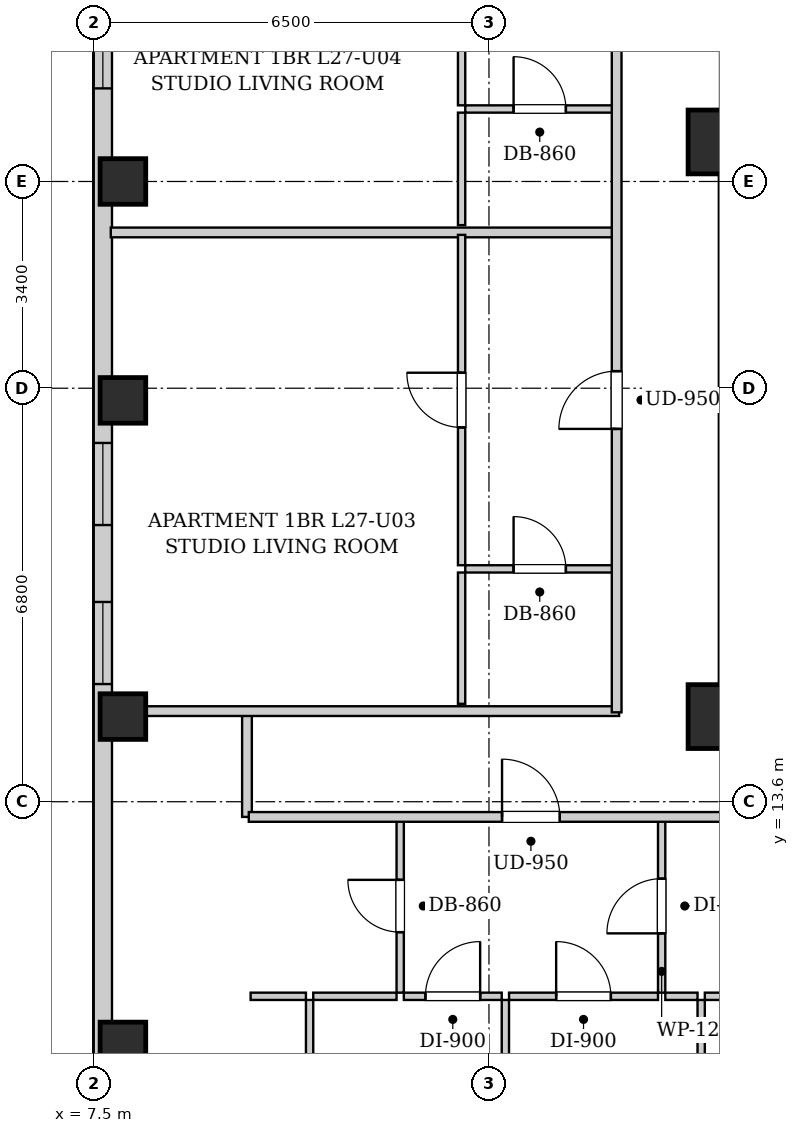
"""IFC4 building model, lengths in metres.
Left out: names, types, materials, properties, quantities, classifications, styles, units other than length and angle.
Written with IfcOpenShell. Run it as: python <this file> out.ifc"""

import sys

from ifc_helpers import new_model, si_unit, direction, frame, frame_2d, origin, origin_2d, place, context, subcontext, project, spatial, rectangle, extrude, element, fill, save


model = new_model("IFC4")
c1 = context("Model", 3, precision=1e-05, world=origin(), true_north=direction((0.0, 1.0)))
c2 = subcontext(c1, "Body", "Model", "MODEL_VIEW")
j1 = project(units=[si_unit("LENGTHUNIT", "METRE"), si_unit("PLANEANGLEUNIT", "RADIAN")], contexts=[c1])
p1 = place(None, origin())
s1 = spatial("IfcSite", under=j1, at=p1, CompositionType="ELEMENT")
p2 = place(p1, origin())
s2 = spatial("IfcBuilding", under=s1, at=p2, CompositionType="ELEMENT")
p3 = place(p2, frame((0.0, 0.0, 97.5)))
s3 = spatial("IfcBuildingStorey", under=s2, at=p3, CompositionType="ELEMENT", Elevation=97.5)
for number, where, z_axis, x_axis in (
    (1, (7.98, 9.6, 0.0), (0.0, 0.0, 1.0), (1.0, 0.0, 0.0)),
    (2, (7.98, 15.0, 0.0), (0.0, 0.0, 1.0), (1.0, 0.0, 0.0)),
    (3, (7.98, 20.2, 0.0), (0.0, 0.0, 1.0), (1.0, 0.0, 0.0)),
    (4, (7.98, 23.8, 0.0), (0.0, 0.0, 1.0), (1.0, 0.0, 0.0)),
):
    element("IfcColumn", number, at=place(p3, frame(where, z_axis=z_axis, x_axis=x_axis)), inside=s3, PredefinedType="COLUMN", context=c2, shape_type="SweptSolid", body=[
        extrude(rectangle(XDim=0.75, YDim=0.75, at=origin_2d()), origin(), (0.0, 0.0, 1.0), 3.2),
    ])
for number, where, z_axis, x_axis in (
    (5, (17.8, 15.0, 0.0), (0.0, 0.0, 1.0), (1.0, 0.0, 0.0)),
    (6, (17.8, 24.45, 0.0), (0.0, 0.0, 1.0), (1.0, 0.0, 0.0)),
):
    element("IfcColumn", number, at=place(p3, frame(where, z_axis=z_axis, x_axis=x_axis)), inside=s3, PredefinedType="COLUMN", context=c2, shape_type="SweptSolid", body=[
        extrude(rectangle(XDim=1.05, YDim=1.05, at=origin_2d()), origin(), (0.0, 0.0, 1.0), 3.2),
    ])
p4 = place(p3, frame((7.65, 2.5, 0.0), z_axis=(0.0, 0.0, 1.0), x_axis=(0.0, 1.0, 0.0)))
e7 = element("IfcWall", 7, at=p4, inside=s3, PredefinedType="SOLIDWALL", context=c2, shape_type="SweptSolid", body=[
    extrude(rectangle(XDim=38.3, YDim=0.3, at=frame_2d((19.15, 0.0))), origin(), (0.0, 0.0, 1.0), 2.94),
])
p5 = place(p4, frame((3.38, 0.0, 0.55)))
e8 = element("IfcOpeningElement", 8, at=p5, cuts=e7, PredefinedType="OPENING", context=c2, shape_type="SweptSolid", body=[
    extrude(rectangle(XDim=1.35, YDim=1.2, at=frame_2d((0.675, 0.6))), frame((0.0, 0.16, 0.0), z_axis=(0.0, -1.0, 0.0), x_axis=(1.0, 0.0, 0.0)), (0.0, 0.0, 1.0), 0.32),
])
p6 = place(p4, frame((1.135, 0.0, 0.55)))
e9 = element("IfcOpeningElement", 9, at=p6, cuts=e7, PredefinedType="OPENING", context=c2, shape_type="SweptSolid", body=[
    extrude(rectangle(XDim=1.35, YDim=1.2, at=frame_2d((0.675, 0.6))), frame((0.0, 0.16, 0.0), z_axis=(0.0, -1.0, 0.0), x_axis=(1.0, 0.0, 0.0)), (0.0, 0.0, 1.0), 0.32),
])
p7 = place(p4, frame((33.946, 0.0, 0.55)))
e10 = element("IfcOpeningElement", 10, at=p7, cuts=e7, PredefinedType="OPENING", context=c2, shape_type="SweptSolid", body=[
    extrude(rectangle(XDim=1.35, YDim=1.2, at=frame_2d((0.675, 0.6))), frame((0.0, 0.16, 0.0), z_axis=(0.0, -1.0, 0.0), x_axis=(1.0, 0.0, 0.0)), (0.0, 0.0, 1.0), 0.32),
])
p8 = place(p4, frame((32.035, 0.0, 0.55)))
e11 = element("IfcOpeningElement", 11, at=p8, cuts=e7, PredefinedType="OPENING", context=c2, shape_type="SweptSolid", body=[
    extrude(rectangle(XDim=1.35, YDim=1.2, at=frame_2d((0.675, 0.6))), frame((0.0, 0.16, 0.0), z_axis=(0.0, -1.0, 0.0), x_axis=(1.0, 0.0, 0.0)), (0.0, 0.0, 1.0), 0.32),
])
p9 = place(p4, frame((15.65, 0.0, 0.55)))
e12 = element("IfcOpeningElement", 12, at=p9, cuts=e7, PredefinedType="OPENING", context=c2, shape_type="SweptSolid", body=[
    extrude(rectangle(XDim=1.35, YDim=1.2, at=frame_2d((0.675, 0.6))), frame((0.0, 0.16, 0.0), z_axis=(0.0, -1.0, 0.0), x_axis=(1.0, 0.0, 0.0)), (0.0, 0.0, 1.0), 0.32),
])
p10 = place(p4, frame((13.035, 0.0, 0.55)))
e13 = element("IfcOpeningElement", 13, at=p10, cuts=e7, PredefinedType="OPENING", context=c2, shape_type="SweptSolid", body=[
    extrude(rectangle(XDim=1.35, YDim=1.2, at=frame_2d((0.675, 0.6))), frame((0.0, 0.16, 0.0), z_axis=(0.0, -1.0, 0.0), x_axis=(1.0, 0.0, 0.0)), (0.0, 0.0, 1.0), 0.32),
])
p11 = place(p4, frame((22.831, 0.0, 0.55)))
e14 = element("IfcOpeningElement", 14, at=p11, cuts=e7, PredefinedType="OPENING", context=c2, shape_type="SweptSolid", body=[
    extrude(rectangle(XDim=1.35, YDim=1.2, at=frame_2d((0.675, 0.6))), frame((0.0, 0.16, 0.0), z_axis=(0.0, -1.0, 0.0), x_axis=(1.0, 0.0, 0.0)), (0.0, 0.0, 1.0), 0.32),
])
p12 = place(p4, frame((24.441, 0.0, 0.55)))
e15 = element("IfcOpeningElement", 15, at=p12, cuts=e7, PredefinedType="OPENING", context=c2, shape_type="SweptSolid", body=[
    extrude(rectangle(XDim=1.35, YDim=1.2, at=frame_2d((0.675, 0.6))), frame((0.0, 0.16, 0.0), z_axis=(0.0, -1.0, 0.0), x_axis=(1.0, 0.0, 0.0)), (0.0, 0.0, 1.0), 0.32),
])
p13 = place(p3, frame((10.02, 13.35, 0.0), z_axis=(0.0, 0.0, 1.0), x_axis=(0.0, 1.0, 0.0)))
e16 = element("IfcWall", 16, at=p13, inside=s3, PredefinedType="PARTITIONING", context=c2, shape_type="SweptSolid", body=[
    extrude(rectangle(XDim=1.74, YDim=0.16, at=frame_2d((0.87, 0.0))), origin(), (0.0, 0.0, 1.0), 2.94),
])
p14 = place(p3, frame((7.78, 15.09, 0.0), z_axis=(0.0, 0.0, 1.0), x_axis=(1.0, 0.0, 0.0)))
e17 = element("IfcWall", 17, at=p14, inside=s3, PredefinedType="PARTITIONING", context=c2, shape_type="SweptSolid", body=[
    extrude(rectangle(XDim=8.36, YDim=0.16, at=frame_2d((4.18, 0.0))), origin(), (0.0, 0.0, 1.0), 2.313),
])
p15 = place(p3, frame((12.54, 10.46, 0.0), z_axis=(0.0, 0.0, 1.0), x_axis=(0.0, 1.0, 0.0)))
e18 = element("IfcWall", 18, at=p15, inside=s3, PredefinedType="PARTITIONING", context=c2, shape_type="SweptSolid", body=[
    extrude(rectangle(XDim=2.85, YDim=0.12, at=frame_2d((1.425, 0.0))), origin(), (0.0, 0.0, 1.0), 2.94),
])
p16 = place(p15, frame((0.995, 0.0, 0.0)))
e19 = element("IfcOpeningElement", 19, at=p16, cuts=e18, PredefinedType="OPENING", context=c2, shape_type="SweptSolid", body=[
    extrude(rectangle(XDim=0.86, YDim=2.05, at=frame_2d((0.43, 1.025))), frame((0.0, 0.07, 0.0), z_axis=(0.0, -1.0, 0.0), x_axis=(1.0, 0.0, 0.0)), (0.0, 0.0, 1.0), 0.14),
])
p17 = place(p3, frame((10.08, 10.4, 0.0), z_axis=(0.0, 0.0, 1.0), x_axis=(1.0, 0.0, 0.0)))
e20 = element("IfcWall", 20, at=p17, inside=s3, PredefinedType="PARTITIONING", context=c2, shape_type="SweptSolid", body=[
    extrude(rectangle(XDim=0.91, YDim=0.12, at=frame_2d((0.455, 0.0))), origin(), (0.0, 0.0, 1.0), 2.94),
])
p18 = place(p3, frame((11.11, 10.4, 0.0), z_axis=(0.0, 0.0, 1.0), x_axis=(1.0, 0.0, 0.0)))
e21 = element("IfcWall", 21, at=p18, inside=s3, PredefinedType="PARTITIONING", context=c2, shape_type="SweptSolid", body=[
    extrude(rectangle(XDim=1.37, YDim=0.12, at=frame_2d((0.685, 0.0))), origin(), (0.0, 0.0, 1.0), 2.94),
])
p19 = place(p3, frame((16.84, 10.46, 0.0), z_axis=(0.0, 0.0, 1.0), x_axis=(0.0, 1.0, 0.0)))
e22 = element("IfcWall", 22, at=p19, inside=s3, PredefinedType="PARTITIONING", context=c2, shape_type="SweptSolid", body=[
    extrude(rectangle(XDim=2.85, YDim=0.12, at=frame_2d((1.425, 0.0))), origin(), (0.0, 0.0, 1.0), 2.94),
])
p20 = place(p19, frame((0.975, 0.0, 0.0)))
e23 = element("IfcOpeningElement", 23, at=p20, cuts=e22, PredefinedType="OPENING", context=c2, shape_type="SweptSolid", body=[
    extrude(rectangle(XDim=0.9, YDim=2.05, at=frame_2d((0.45, 1.025))), frame((0.0, 0.07, 0.0), z_axis=(0.0, -1.0, 0.0), x_axis=(1.0, 0.0, 0.0)), (0.0, 0.0, 1.0), 0.14),
])
p21 = place(p3, frame((12.6, 10.4, 0.0), z_axis=(0.0, 0.0, 1.0), x_axis=(1.0, 0.0, 0.0)))
e24 = element("IfcWall", 24, at=p21, inside=s3, PredefinedType="PARTITIONING", context=c2, shape_type="SweptSolid", body=[
    extrude(rectangle(XDim=1.61, YDim=0.12, at=frame_2d((0.805, 0.0))), origin(), (0.0, 0.0, 1.0), 2.94),
])
p22 = place(p21, frame((0.355, 0.0, 0.0)))
e25 = element("IfcOpeningElement", 25, at=p22, cuts=e24, PredefinedType="OPENING", context=c2, shape_type="SweptSolid", body=[
    extrude(rectangle(XDim=0.9, YDim=2.05, at=frame_2d((0.45, 1.025))), frame((0.0, 0.07, 0.0), z_axis=(0.0, -1.0, 0.0), x_axis=(1.0, 0.0, 0.0)), (0.0, 0.0, 1.0), 0.14),
])
p23 = place(p3, frame((14.33, 10.4, 0.0), z_axis=(0.0, 0.0, 1.0), x_axis=(1.0, 0.0, 0.0)))
e26 = element("IfcWall", 26, at=p23, inside=s3, PredefinedType="PARTITIONING", context=c2, shape_type="SweptSolid", body=[
    extrude(rectangle(XDim=2.45, YDim=0.12, at=frame_2d((1.225, 0.0))), origin(), (0.0, 0.0, 1.0), 2.94),
])
p24 = place(p23, frame((0.775, 0.0, 0.0)))
e27 = element("IfcOpeningElement", 27, at=p24, cuts=e26, PredefinedType="OPENING", context=c2, shape_type="SweptSolid", body=[
    extrude(rectangle(XDim=0.9, YDim=2.05, at=frame_2d((0.45, 1.025))), frame((0.0, 0.07, 0.0), z_axis=(0.0, -1.0, 0.0), x_axis=(1.0, 0.0, 0.0)), (0.0, 0.0, 1.0), 0.14),
])
p25 = place(p3, frame((16.9, 10.4, 0.0), z_axis=(0.0, 0.0, 1.0), x_axis=(1.0, 0.0, 0.0)))
e28 = element("IfcWall", 28, at=p25, inside=s3, PredefinedType="PARTITIONING", context=c2, shape_type="SweptSolid", body=[
    extrude(rectangle(XDim=0.53, YDim=0.12, at=frame_2d((0.265, 0.0))), origin(), (0.0, 0.0, 1.0), 2.94),
])
p26 = place(p3, frame((17.55, 10.4, 0.0), z_axis=(0.0, 0.0, 1.0), x_axis=(1.0, 0.0, 0.0)))
e29 = element("IfcWall", 29, at=p26, inside=s3, PredefinedType="PARTITIONING", context=c2, shape_type="SweptSolid", body=[
    extrude(rectangle(XDim=2.5, YDim=0.12, at=frame_2d((1.25, 0.0))), origin(), (0.0, 0.0, 1.0), 2.94),
])
p27 = place(p26, frame((0.8, 0.0, 0.0)))
e30 = element("IfcOpeningElement", 30, at=p27, cuts=e29, PredefinedType="OPENING", context=c2, shape_type="SweptSolid", body=[
    extrude(rectangle(XDim=0.9, YDim=2.05, at=frame_2d((0.45, 1.025))), frame((0.0, 0.07, 0.0), z_axis=(0.0, -1.0, 0.0), x_axis=(1.0, 0.0, 0.0)), (0.0, 0.0, 1.0), 0.14),
])
p28 = place(p3, frame((11.05, 0.28, 0.0), z_axis=(0.0, 0.0, 1.0), x_axis=(0.0, 1.0, 0.0)))
e31 = element("IfcWall", 31, at=p28, inside=s3, PredefinedType="PARTITIONING", context=c2, shape_type="SweptSolid", body=[
    extrude(rectangle(XDim=10.06, YDim=0.12, at=frame_2d((5.03, 0.0))), origin(), (0.0, 0.0, 1.0), 2.94),
])
p29 = place(p28, frame((4.565, 0.0, 0.0)))
e32 = element("IfcOpeningElement", 32, at=p29, cuts=e31, PredefinedType="OPENING", context=c2, shape_type="SweptSolid", body=[
    extrude(rectangle(XDim=0.9, YDim=2.05, at=frame_2d((0.45, 1.025))), frame((0.0, 0.07, 0.0), z_axis=(0.0, -1.0, 0.0), x_axis=(1.0, 0.0, 0.0)), (0.0, 0.0, 1.0), 0.14),
])
p30 = place(p3, frame((14.27, 2.43, 0.0), z_axis=(0.0, 0.0, 1.0), x_axis=(0.0, 1.0, 0.0)))
e33 = element("IfcWall", 33, at=p30, inside=s3, PredefinedType="PARTITIONING", context=c2, shape_type="SweptSolid", body=[
    extrude(rectangle(XDim=7.91, YDim=0.12, at=frame_2d((3.955, 0.0))), origin(), (0.0, 0.0, 1.0), 2.94),
])
p31 = place(p30, frame((3.505, 0.0, 0.0)))
e34 = element("IfcOpeningElement", 34, at=p31, cuts=e33, PredefinedType="OPENING", context=c2, shape_type="SweptSolid", body=[
    extrude(rectangle(XDim=0.9, YDim=2.05, at=frame_2d((0.45, 1.025))), frame((0.0, 0.07, 0.0), z_axis=(0.0, -1.0, 0.0), x_axis=(1.0, 0.0, 0.0)), (0.0, 0.0, 1.0), 0.14),
])
p32 = place(p3, frame((17.49, 0.28, 0.0), z_axis=(0.0, 0.0, 1.0), x_axis=(0.0, 1.0, 0.0)))
e35 = element("IfcWall", 35, at=p32, inside=s3, PredefinedType="PARTITIONING", context=c2, shape_type="SweptSolid", body=[
    extrude(rectangle(XDim=10.06, YDim=0.12, at=frame_2d((5.03, 0.0))), origin(), (0.0, 0.0, 1.0), 2.94),
])
p33 = place(p32, frame((4.565, 0.0, 0.0)))
e36 = element("IfcOpeningElement", 36, at=p33, cuts=e35, PredefinedType="OPENING", context=c2, shape_type="SweptSolid", body=[
    extrude(rectangle(XDim=0.9, YDim=2.05, at=frame_2d((0.45, 1.025))), frame((0.0, 0.07, 0.0), z_axis=(0.0, -1.0, 0.0), x_axis=(1.0, 0.0, 0.0)), (0.0, 0.0, 1.0), 0.14),
])
p34 = place(p3, frame((7.78, 22.962, 0.0), z_axis=(0.0, 0.0, 1.0), x_axis=(1.0, 0.0, 0.0)))
e37 = element("IfcWall", 37, at=p34, inside=s3, PredefinedType="PARTITIONING", context=c2, shape_type="SweptSolid", body=[
    extrude(rectangle(XDim=8.28, YDim=0.16, at=frame_2d((4.14, 0.0))), origin(), (0.0, 0.0, 1.0), 2.94),
])
p35 = place(p3, frame((13.61, 17.429, 0.0), z_axis=(0.0, 0.0, 1.0), x_axis=(1.0, 0.0, 0.0)))
e38 = element("IfcWall", 38, at=p35, inside=s3, PredefinedType="PARTITIONING", context=c2, shape_type="SweptSolid", body=[
    extrude(rectangle(XDim=2.45, YDim=0.12, at=frame_2d((1.225, 0.0))), origin(), (0.0, 0.0, 1.0), 2.94),
])
p36 = place(p35, frame((0.795, 0.0, 0.0)))
e39 = element("IfcOpeningElement", 39, at=p36, cuts=e38, PredefinedType="OPENING", context=c2, shape_type="SweptSolid", body=[
    extrude(rectangle(XDim=0.86, YDim=2.05, at=frame_2d((0.43, 1.025))), frame((0.0, 0.07, 0.0), z_axis=(0.0, -1.0, 0.0), x_axis=(1.0, 0.0, 0.0)), (0.0, 0.0, 1.0), 0.14),
])
p37 = place(p3, frame((13.55, 15.21, 0.0), z_axis=(0.0, 0.0, 1.0), x_axis=(0.0, 1.0, 0.0)))
e40 = element("IfcWall", 40, at=p37, inside=s3, PredefinedType="PARTITIONING", context=c2, shape_type="SweptSolid", body=[
    extrude(rectangle(XDim=2.159, YDim=0.12, at=frame_2d((1.08, 0.0))), origin(), (0.0, 0.0, 1.0), 2.94),
])
p38 = place(p3, frame((13.55, 17.489, 0.0), z_axis=(0.0, 0.0, 1.0), x_axis=(0.0, 1.0, 0.0)))
e41 = element("IfcWall", 41, at=p38, inside=s3, PredefinedType="PARTITIONING", context=c2, shape_type="SweptSolid", body=[
    extrude(rectangle(XDim=5.433, YDim=0.12, at=frame_2d((2.717, 0.0))), origin(), (0.0, 0.0, 1.0), 2.94),
])
p39 = place(p38, frame((2.266, 0.0, 0.0)))
e42 = element("IfcOpeningElement", 42, at=p39, cuts=e41, PredefinedType="OPENING", context=c2, shape_type="SweptSolid", body=[
    extrude(rectangle(XDim=0.9, YDim=2.05, at=frame_2d((0.45, 1.025))), frame((0.0, 0.07, 0.0), z_axis=(0.0, -1.0, 0.0), x_axis=(1.0, 0.0, 0.0)), (0.0, 0.0, 1.0), 0.14),
])
p40 = place(p3, frame((13.61, 24.992, 0.0), z_axis=(0.0, 0.0, 1.0), x_axis=(1.0, 0.0, 0.0)))
e43 = element("IfcWall", 43, at=p40, inside=s3, PredefinedType="PARTITIONING", context=c2, shape_type="SweptSolid", body=[
    extrude(rectangle(XDim=2.45, YDim=0.12, at=frame_2d((1.225, 0.0))), origin(), (0.0, 0.0, 1.0), 2.94),
])
p41 = place(p40, frame((0.795, 0.0, 0.0)))
e44 = element("IfcOpeningElement", 44, at=p41, cuts=e43, PredefinedType="OPENING", context=c2, shape_type="SweptSolid", body=[
    extrude(rectangle(XDim=0.86, YDim=2.05, at=frame_2d((0.43, 1.025))), frame((0.0, 0.07, 0.0), z_axis=(0.0, -1.0, 0.0), x_axis=(1.0, 0.0, 0.0)), (0.0, 0.0, 1.0), 0.14),
])
p42 = place(p3, frame((13.55, 23.082, 0.0), z_axis=(0.0, 0.0, 1.0), x_axis=(0.0, 1.0, 0.0)))
e45 = element("IfcWall", 45, at=p42, inside=s3, PredefinedType="PARTITIONING", context=c2, shape_type="SweptSolid", body=[
    extrude(rectangle(XDim=1.85, YDim=0.12, at=frame_2d((0.925, 0.0))), origin(), (0.0, 0.0, 1.0), 2.94),
])
p43 = place(p3, frame((13.55, 25.052, 0.0), z_axis=(0.0, 0.0, 1.0), x_axis=(0.0, 1.0, 0.0)))
e46 = element("IfcWall", 46, at=p43, inside=s3, PredefinedType="PARTITIONING", context=c2, shape_type="SweptSolid", body=[
    extrude(rectangle(XDim=3.808, YDim=0.12, at=frame_2d((1.904, 0.0))), origin(), (0.0, 0.0, 1.0), 2.94),
])
p44 = place(p43, frame((1.454, 0.0, 0.0)))
e47 = element("IfcOpeningElement", 47, at=p44, cuts=e46, PredefinedType="OPENING", context=c2, shape_type="SweptSolid", body=[
    extrude(rectangle(XDim=0.9, YDim=2.05, at=frame_2d((0.45, 1.025))), frame((0.0, 0.07, 0.0), z_axis=(0.0, -1.0, 0.0), x_axis=(1.0, 0.0, 0.0)), (0.0, 0.0, 1.0), 0.14),
])
p45 = place(p3, frame((10.05, 13.35, 0.0), z_axis=(0.0, 0.0, 1.0), x_axis=(1.0, 0.0, 0.0)))
e48 = element("IfcWall", 48, at=p45, inside=s3, PredefinedType="PARTITIONING", context=c2, shape_type="SweptSolid", body=[
    extrude(rectangle(XDim=30.8, YDim=0.16, at=frame_2d((15.4, 0.0))), origin(), (0.0, 0.0, 1.0), 2.94),
])
p46 = place(p45, frame((4.165, 0.0, 0.0)))
e49 = element("IfcOpeningElement", 49, at=p46, cuts=e48, PredefinedType="OPENING", context=c2, shape_type="SweptSolid", body=[
    extrude(rectangle(XDim=0.95, YDim=2.1, at=frame_2d((0.475, 1.05))), frame((0.0, 0.09, 0.0), z_axis=(0.0, -1.0, 0.0), x_axis=(1.0, 0.0, 0.0)), (0.0, 0.0, 1.0), 0.18),
])
p47 = place(p3, frame((16.1, 15.07, 0.0), z_axis=(0.0, 0.0, 1.0), x_axis=(0.0, 1.0, 0.0)))
e50 = element("IfcWall", 50, at=p47, inside=s3, PredefinedType="PARTITIONING", context=c2, shape_type="SweptSolid", body=[
    extrude(rectangle(XDim=13.93, YDim=0.16, at=frame_2d((6.965, 0.0))), origin(), (0.0, 0.0, 1.0), 2.94),
])
p48 = place(p47, frame((4.661, 0.0, 0.0)))
e51 = element("IfcOpeningElement", 51, at=p48, cuts=e50, PredefinedType="OPENING", context=c2, shape_type="SweptSolid", body=[
    extrude(rectangle(XDim=0.95, YDim=2.1, at=frame_2d((0.475, 1.05))), frame((0.0, 0.09, 0.0), z_axis=(0.0, -1.0, 0.0), x_axis=(1.0, 0.0, 0.0)), (0.0, 0.0, 1.0), 0.18),
])
p49 = place(p47, frame((11.411, 0.0, 0.0)))
e52 = element("IfcOpeningElement", 52, at=p49, cuts=e50, PredefinedType="OPENING", context=c2, shape_type="SweptSolid", body=[
    extrude(rectangle(XDim=0.95, YDim=2.1, at=frame_2d((0.475, 1.05))), frame((0.0, 0.09, 0.0), z_axis=(0.0, -1.0, 0.0), x_axis=(1.0, 0.0, 0.0)), (0.0, 0.0, 1.0), 0.18),
])
p50 = place(p16, origin())
e53 = element("IfcDoor", 53, at=p50, inside=s3, OperationType="SINGLE_SWING_RIGHT", PredefinedType="DOOR", context=c2, shape_type="SweptSolid", body=[
    extrude(rectangle(XDim=0.86, YDim=2.05, at=frame_2d((0.43, 1.025))), frame((0.0, 0.025, 0.0), z_axis=(0.0, -1.0, 0.0), x_axis=(1.0, 0.0, 0.0)), (0.0, 0.0, 1.0), 0.05),
])
fill(e19, e53)
p51 = place(p20, origin())
e54 = element("IfcDoor", 54, at=p51, inside=s3, OperationType="SINGLE_SWING_LEFT", PredefinedType="DOOR", context=c2, shape_type="SweptSolid", body=[
    extrude(rectangle(XDim=0.9, YDim=2.05, at=frame_2d((0.45, 1.025))), frame((0.0, 0.025, 0.0), z_axis=(0.0, -1.0, 0.0), x_axis=(1.0, 0.0, 0.0)), (0.0, 0.0, 1.0), 0.05),
])
fill(e23, e54)
p52 = place(p22, origin())
e55 = element("IfcDoor", 55, at=p52, inside=s3, OperationType="SINGLE_SWING_RIGHT", PredefinedType="DOOR", context=c2, shape_type="SweptSolid", body=[
    extrude(rectangle(XDim=0.9, YDim=2.05, at=frame_2d((0.45, 1.025))), frame((0.0, 0.025, 0.0), z_axis=(0.0, -1.0, 0.0), x_axis=(1.0, 0.0, 0.0)), (0.0, 0.0, 1.0), 0.05),
])
fill(e25, e55)
p53 = place(p24, origin())
e56 = element("IfcDoor", 56, at=p53, inside=s3, OperationType="SINGLE_SWING_LEFT", PredefinedType="DOOR", context=c2, shape_type="SweptSolid", body=[
    extrude(rectangle(XDim=0.9, YDim=2.05, at=frame_2d((0.45, 1.025))), frame((0.0, 0.025, 0.0), z_axis=(0.0, -1.0, 0.0), x_axis=(1.0, 0.0, 0.0)), (0.0, 0.0, 1.0), 0.05),
])
fill(e27, e56)
p54 = place(p36, origin())
e57 = element("IfcDoor", 57, at=p54, inside=s3, OperationType="SINGLE_SWING_LEFT", PredefinedType="DOOR", context=c2, shape_type="SweptSolid", body=[
    extrude(rectangle(XDim=0.86, YDim=2.05, at=frame_2d((0.43, 1.025))), frame((0.0, 0.025, 0.0), z_axis=(0.0, -1.0, 0.0), x_axis=(1.0, 0.0, 0.0)), (0.0, 0.0, 1.0), 0.05),
])
fill(e39, e57)
p55 = place(p39, origin())
e58 = element("IfcDoor", 58, at=p55, inside=s3, OperationType="SINGLE_SWING_RIGHT", PredefinedType="DOOR", context=c2, shape_type="SweptSolid", body=[
    extrude(rectangle(XDim=0.9, YDim=2.05, at=frame_2d((0.45, 1.025))), frame((0.0, 0.025, 0.0), z_axis=(0.0, -1.0, 0.0), x_axis=(1.0, 0.0, 0.0)), (0.0, 0.0, 1.0), 0.05),
])
fill(e42, e58)
p56 = place(p41, origin())
e59 = element("IfcDoor", 59, at=p56, inside=s3, OperationType="SINGLE_SWING_LEFT", PredefinedType="DOOR", context=c2, shape_type="SweptSolid", body=[
    extrude(rectangle(XDim=0.86, YDim=2.05, at=frame_2d((0.43, 1.025))), frame((0.0, 0.025, 0.0), z_axis=(0.0, -1.0, 0.0), x_axis=(1.0, 0.0, 0.0)), (0.0, 0.0, 1.0), 0.05),
])
fill(e44, e59)
p57 = place(p46, origin())
e60 = element("IfcDoor", 60, at=p57, inside=s3, OperationType="SINGLE_SWING_LEFT", PredefinedType="DOOR", context=c2, shape_type="SweptSolid", body=[
    extrude(rectangle(XDim=0.95, YDim=2.1, at=frame_2d((0.475, 1.05))), frame((0.0, 0.025, 0.0), z_axis=(0.0, -1.0, 0.0), x_axis=(1.0, 0.0, 0.0)), (0.0, 0.0, 1.0), 0.05),
])
fill(e49, e60)
p58 = place(p48, origin())
e61 = element("IfcDoor", 61, at=p58, inside=s3, OperationType="SINGLE_SWING_LEFT", PredefinedType="DOOR", context=c2, shape_type="SweptSolid", body=[
    extrude(rectangle(XDim=0.95, YDim=2.1, at=frame_2d((0.475, 1.05))), frame((0.0, 0.025, 0.0), z_axis=(0.0, -1.0, 0.0), x_axis=(1.0, 0.0, 0.0)), (0.0, 0.0, 1.0), 0.05),
])
fill(e51, e61)
p59 = place(p9, origin())
e62 = element("IfcWindow", 62, at=p59, inside=s3, PartitioningType="SINGLE_PANEL", PredefinedType="WINDOW", context=c2, shape_type="SweptSolid", body=[
    extrude(rectangle(XDim=1.35, YDim=1.2, at=frame_2d((0.675, 0.6))), frame((0.0, 0.03, 0.0), z_axis=(0.0, -1.0, 0.0), x_axis=(1.0, 0.0, 0.0)), (0.0, 0.0, 1.0), 0.06),
])
fill(e12, e62)
p60 = place(p10, origin())
e63 = element("IfcWindow", 63, at=p60, inside=s3, PartitioningType="SINGLE_PANEL", PredefinedType="WINDOW", context=c2, shape_type="SweptSolid", body=[
    extrude(rectangle(XDim=1.35, YDim=1.2, at=frame_2d((0.675, 0.6))), frame((0.0, 0.03, 0.0), z_axis=(0.0, -1.0, 0.0), x_axis=(1.0, 0.0, 0.0)), (0.0, 0.0, 1.0), 0.06),
])
fill(e13, e63)
p61 = place(p11, origin())
e64 = element("IfcWindow", 64, at=p61, inside=s3, PartitioningType="SINGLE_PANEL", PredefinedType="WINDOW", context=c2, shape_type="SweptSolid", body=[
    extrude(rectangle(XDim=1.35, YDim=1.2, at=frame_2d((0.675, 0.6))), frame((0.0, 0.03, 0.0), z_axis=(0.0, -1.0, 0.0), x_axis=(1.0, 0.0, 0.0)), (0.0, 0.0, 1.0), 0.06),
])
fill(e14, e64)
save(model, sys.argv[1])
